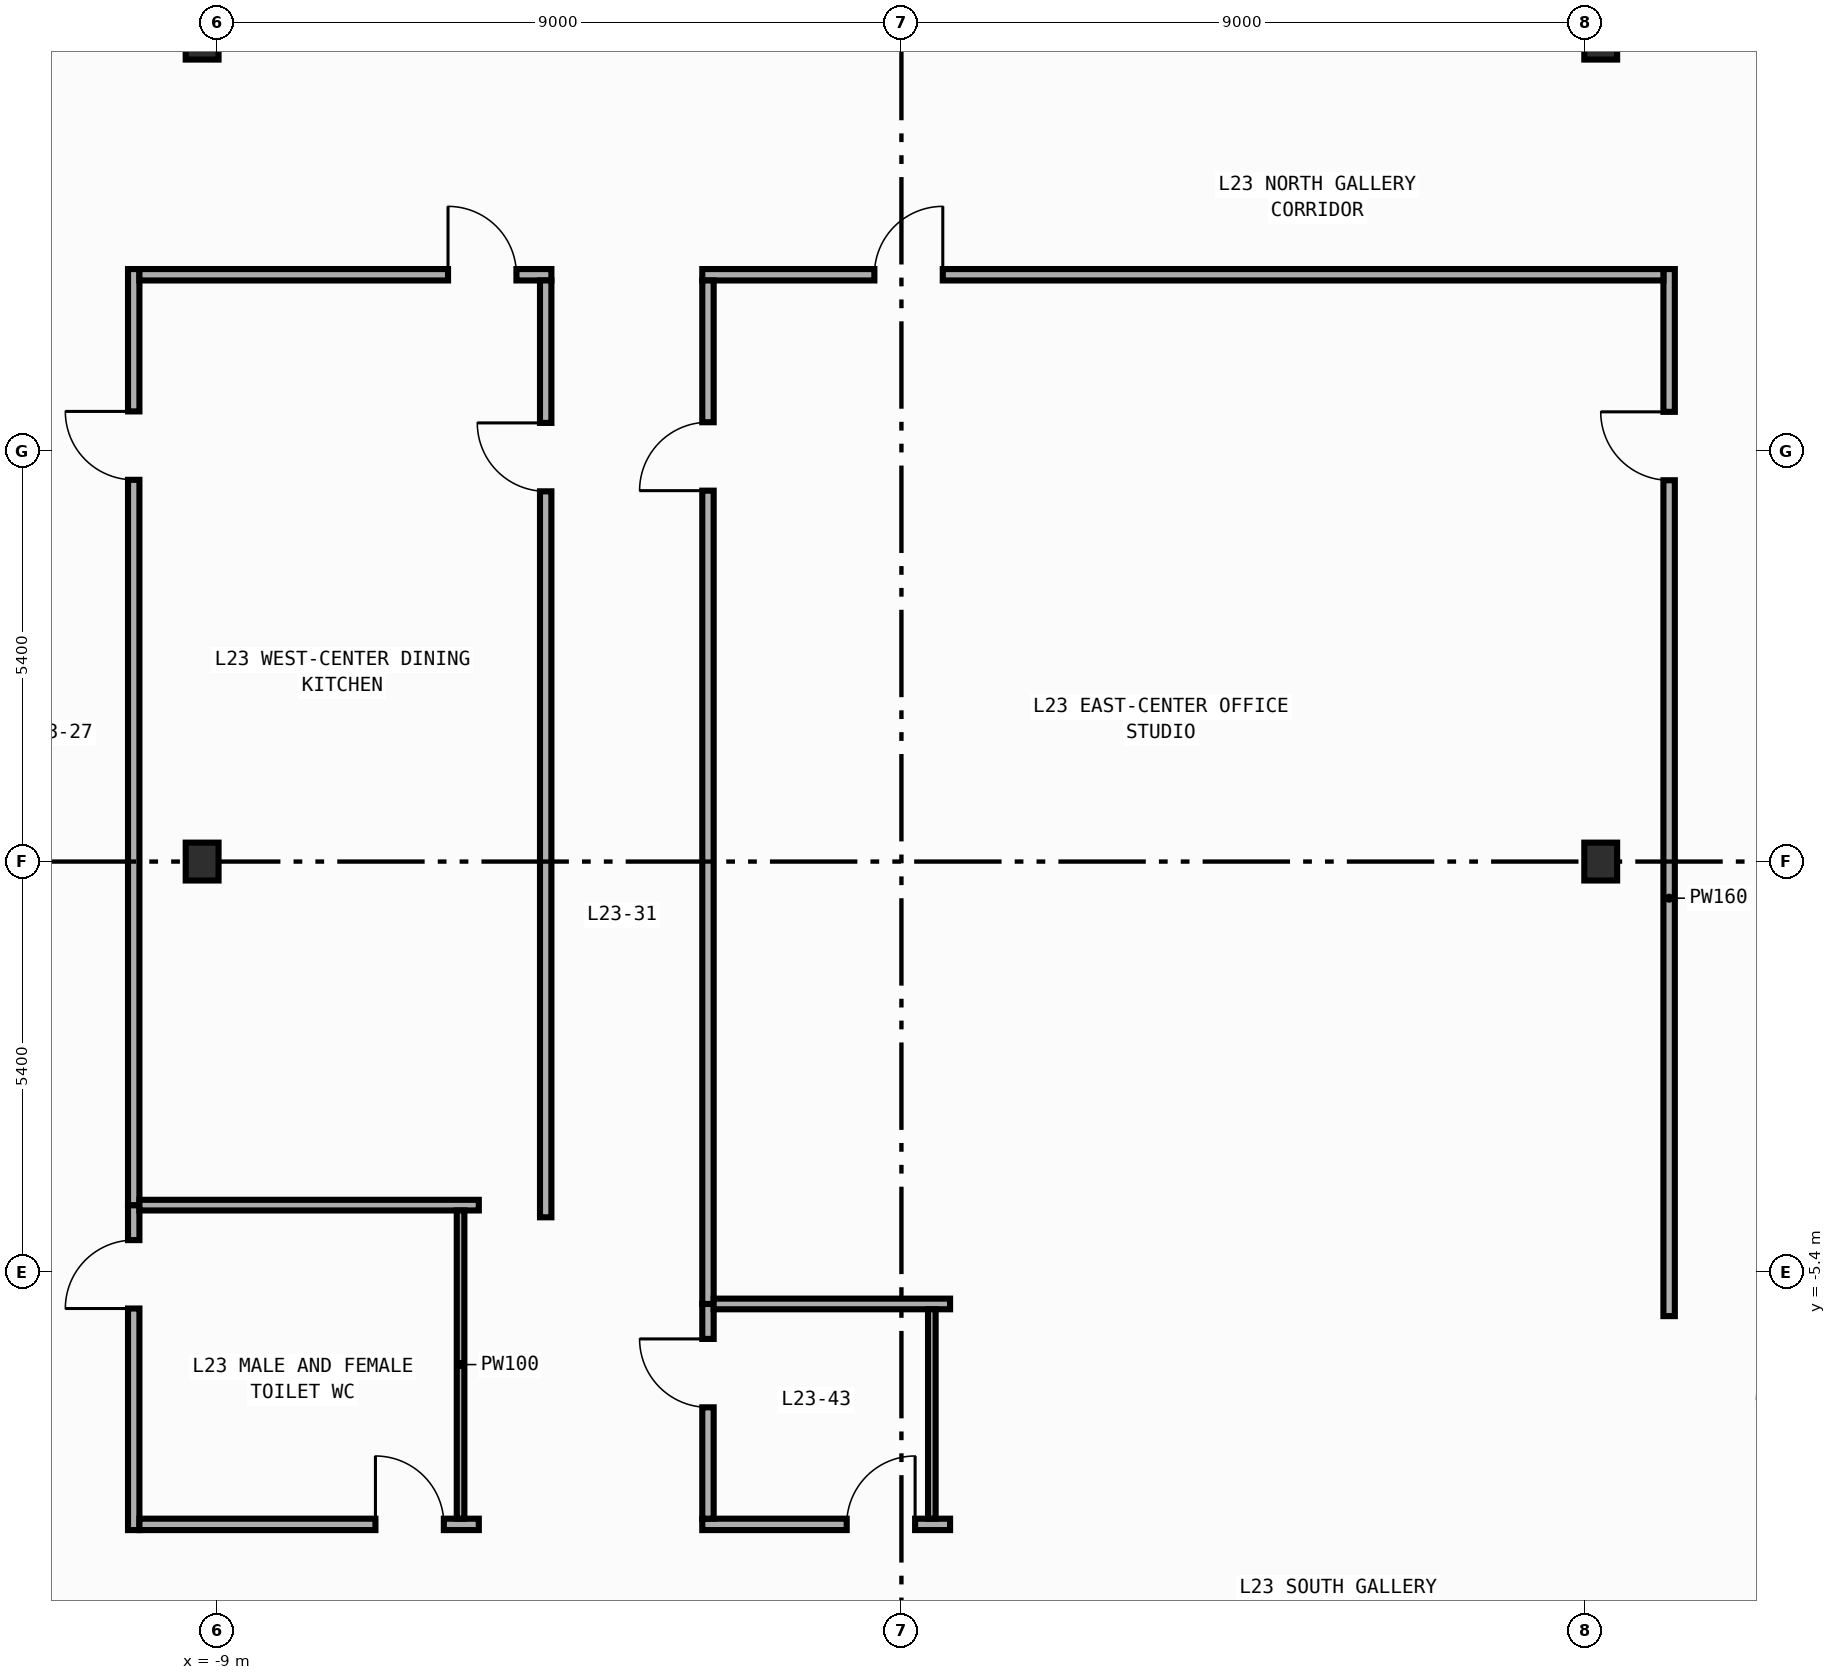
"""IFC4 building model, lengths in metres.
Left out: names, types, materials, properties, quantities, classifications, styles, units other than length and angle.
Written with IfcOpenShell. Run it as: python <this file> out.ifc"""

import sys

from ifc_helpers import new_model, si_unit, direction, frame, frame_2d, origin, origin_2d, place, context, subcontext, project, spatial, rectangle, i_section, extrude, element, fill, save


model = new_model("IFC4")
c1 = context("Model", 3, precision=1e-05, world=origin(), true_north=direction((0.0, 1.0)))
c2 = subcontext(c1, "Body", "Model", "MODEL_VIEW")
j1 = project(units=[si_unit("LENGTHUNIT", "METRE"), si_unit("PLANEANGLEUNIT", "RADIAN")], contexts=[c1])
p1 = place(None, origin())
s1 = spatial("IfcSite", under=j1, at=p1, CompositionType="ELEMENT")
p2 = place(p1, origin())
s2 = spatial("IfcBuilding", under=s1, at=p2, CompositionType="ELEMENT")
p3 = place(p2, frame((0.0, 0.0, 101.6)))
s3 = spatial("IfcBuildingStorey", under=s2, at=p3, CompositionType="ELEMENT", Elevation=101.6)
for number, where, z_axis, x_axis in (
    (1, (-9.2, 0.0, 0.0), (0.0, 0.0, 1.0), (1.0, 0.0, 0.0)),
    (2, (-9.2, 10.8, 0.0), (0.0, 0.0, 1.0), (1.0, 0.0, 0.0)),
    (3, (9.2, 0.0, 0.0), (0.0, 0.0, 1.0), (1.0, 0.0, 0.0)),
    (4, (9.2, 10.8, 0.0), (0.0, 0.0, 1.0), (1.0, 0.0, 0.0)),
):
    element("IfcColumn", number, at=place(p3, frame(where, z_axis=z_axis, x_axis=x_axis)), inside=s3, PredefinedType="COLUMN", context=c2, shape_type="SweptSolid", body=[
        extrude(i_section(OverallWidth=0.432, OverallDepth=0.498, WebThickness=0.045, FlangeThickness=0.07, FilletRadius=0.022, at=origin_2d()), origin(), (0.0, 0.0, 1.0), 4.2),
    ])
p4 = place(p3, frame((-10.1, -8.795, 0.0), z_axis=(0.0, 0.0, 1.0), x_axis=(0.0, 1.0, 0.0)))
e5 = element("IfcWall", 5, at=p4, inside=s3, PredefinedType="PARTITIONING", context=c2, shape_type="SweptSolid", body=[
    extrude(rectangle(XDim=4.275, YDim=0.15, at=frame_2d((2.137, 0.0))), origin(), (0.0, 0.0, 1.0), 3.94),
])
p5 = place(p4, frame((2.915, 0.0, 0.0)))
e6 = element("IfcOpeningElement", 6, at=p5, cuts=e5, PredefinedType="OPENING", context=c2, shape_type="SweptSolid", body=[
    extrude(rectangle(XDim=0.9, YDim=2.15, at=frame_2d((0.45, 1.075))), frame((0.0, 0.085, 0.0), z_axis=(0.0, -1.0, 0.0), x_axis=(1.0, 0.0, 0.0)), (0.0, 0.0, 1.0), 0.17),
])
p6 = place(p3, frame((-10.1, -4.52, 0.0), z_axis=(0.0, 0.0, 1.0), x_axis=(0.0, 1.0, 0.0)))
e7 = element("IfcWall", 7, at=p6, inside=s3, PredefinedType="PARTITIONING", context=c2, shape_type="SweptSolid", body=[
    extrude(rectangle(XDim=12.315, YDim=0.15, at=frame_2d((6.157, 0.0))), origin(), (0.0, 0.0, 1.0), 3.94),
])
p7 = place(p6, frame((9.542, 0.0, 0.0)))
e8 = element("IfcOpeningElement", 8, at=p7, cuts=e7, PredefinedType="OPENING", context=c2, shape_type="SweptSolid", body=[
    extrude(rectangle(XDim=0.9, YDim=2.15, at=frame_2d((0.45, 1.075))), frame((0.0, 0.085, 0.0), z_axis=(0.0, -1.0, 0.0), x_axis=(1.0, 0.0, 0.0)), (0.0, 0.0, 1.0), 0.17),
])
p8 = place(p3, frame((10.1, -5.98, 0.0), z_axis=(0.0, 0.0, 1.0), x_axis=(0.0, 1.0, 0.0)))
e9 = element("IfcWall", 9, at=p8, inside=s3, PredefinedType="PARTITIONING", context=c2, shape_type="SweptSolid", body=[
    extrude(rectangle(XDim=13.775, YDim=0.15, at=frame_2d((6.887, 0.0))), origin(), (0.0, 0.0, 1.0), 3.94),
])
p9 = place(p8, frame((10.997, 0.0, 0.0)))
e10 = element("IfcOpeningElement", 10, at=p9, cuts=e9, PredefinedType="OPENING", context=c2, shape_type="SweptSolid", body=[
    extrude(rectangle(XDim=0.9, YDim=2.15, at=frame_2d((0.45, 1.075))), frame((0.0, 0.085, 0.0), z_axis=(0.0, -1.0, 0.0), x_axis=(1.0, 0.0, 0.0)), (0.0, 0.0, 1.0), 0.17),
])
p10 = place(p3, frame((-2.62, 7.72, 0.0), z_axis=(0.0, 0.0, 1.0), x_axis=(1.0, 0.0, 0.0)))
e11 = element("IfcWall", 11, at=p10, inside=s3, PredefinedType="PARTITIONING", context=c2, shape_type="SweptSolid", body=[
    extrude(rectangle(XDim=12.645, YDim=0.15, at=frame_2d((6.323, 0.0))), origin(), (0.0, 0.0, 1.0), 3.94),
])
p11 = place(p10, frame((2.264, 0.0, 0.0)))
e12 = element("IfcOpeningElement", 12, at=p11, cuts=e11, PredefinedType="OPENING", context=c2, shape_type="SweptSolid", body=[
    extrude(rectangle(XDim=0.9, YDim=2.15, at=frame_2d((0.45, 1.075))), frame((0.0, 0.085, 0.0), z_axis=(0.0, -1.0, 0.0), x_axis=(1.0, 0.0, 0.0)), (0.0, 0.0, 1.0), 0.17),
])
p12 = place(p3, frame((-10.025, 7.72, 0.0), z_axis=(0.0, 0.0, 1.0), x_axis=(1.0, 0.0, 0.0)))
e13 = element("IfcWall", 13, at=p12, inside=s3, PredefinedType="PARTITIONING", context=c2, shape_type="SweptSolid", body=[
    extrude(rectangle(XDim=5.42, YDim=0.15, at=frame_2d((2.71, 0.0))), origin(), (0.0, 0.0, 1.0), 3.94),
])
p13 = place(p12, frame((4.06, 0.0, 0.0)))
e14 = element("IfcOpeningElement", 14, at=p13, cuts=e13, PredefinedType="OPENING", context=c2, shape_type="SweptSolid", body=[
    extrude(rectangle(XDim=0.9, YDim=2.15, at=frame_2d((0.45, 1.075))), frame((0.0, 0.085, 0.0), z_axis=(0.0, -1.0, 0.0), x_axis=(1.0, 0.0, 0.0)), (0.0, 0.0, 1.0), 0.17),
])
p14 = place(p3, frame((-2.62, -8.72, 0.0), z_axis=(0.0, 0.0, 1.0), x_axis=(1.0, 0.0, 0.0)))
e15 = element("IfcWall", 15, at=p14, inside=s3, PredefinedType="PARTITIONING", context=c2, shape_type="SweptSolid", body=[
    extrude(rectangle(XDim=3.26, YDim=0.15, at=frame_2d((1.63, 0.0))), origin(), (0.0, 0.0, 1.0), 3.94),
])
p15 = place(p14, frame((1.9, 0.0, 0.0)))
e16 = element("IfcOpeningElement", 16, at=p15, cuts=e15, PredefinedType="OPENING", context=c2, shape_type="SweptSolid", body=[
    extrude(rectangle(XDim=0.9, YDim=2.15, at=frame_2d((0.45, 1.075))), frame((0.0, 0.085, 0.0), z_axis=(0.0, -1.0, 0.0), x_axis=(1.0, 0.0, 0.0)), (0.0, 0.0, 1.0), 0.17),
])
p16 = place(p3, frame((-10.025, -8.72, 0.0), z_axis=(0.0, 0.0, 1.0), x_axis=(1.0, 0.0, 0.0)))
e17 = element("IfcWall", 17, at=p16, inside=s3, PredefinedType="PARTITIONING", context=c2, shape_type="SweptSolid", body=[
    extrude(rectangle(XDim=4.465, YDim=0.15, at=frame_2d((2.232, 0.0))), origin(), (0.0, 0.0, 1.0), 3.94),
])
p17 = place(p16, frame((3.105, 0.0, 0.0)))
e18 = element("IfcOpeningElement", 18, at=p17, cuts=e17, PredefinedType="OPENING", context=c2, shape_type="SweptSolid", body=[
    extrude(rectangle(XDim=0.9, YDim=2.15, at=frame_2d((0.45, 1.075))), frame((0.0, 0.085, 0.0), z_axis=(0.0, -1.0, 0.0), x_axis=(1.0, 0.0, 0.0)), (0.0, 0.0, 1.0), 0.17),
])
p18 = place(p3, frame((-2.545, -8.645, 0.0), z_axis=(0.0, 0.0, 1.0), x_axis=(0.0, 1.0, 0.0)))
e19 = element("IfcWall", 19, at=p18, inside=s3, PredefinedType="PARTITIONING", context=c2, shape_type="SweptSolid", body=[
    extrude(rectangle(XDim=2.825, YDim=0.15, at=frame_2d((1.413, 0.0))), origin(), (0.0, 0.0, 1.0), 3.94),
])
p19 = place(p18, frame((1.465, 0.0, 0.0)))
e20 = element("IfcOpeningElement", 20, at=p19, cuts=e19, PredefinedType="OPENING", context=c2, shape_type="SweptSolid", body=[
    extrude(rectangle(XDim=0.9, YDim=2.15, at=frame_2d((0.45, 1.075))), frame((0.0, 0.085, 0.0), z_axis=(0.0, -1.0, 0.0), x_axis=(1.0, 0.0, 0.0)), (0.0, 0.0, 1.0), 0.17),
])
p20 = place(p3, frame((-2.545, -5.82, 0.0), z_axis=(0.0, 0.0, 1.0), x_axis=(0.0, 1.0, 0.0)))
e21 = element("IfcWall", 21, at=p20, inside=s3, PredefinedType="PARTITIONING", context=c2, shape_type="SweptSolid", body=[
    extrude(rectangle(XDim=13.465, YDim=0.15, at=frame_2d((6.732, 0.0))), origin(), (0.0, 0.0, 1.0), 3.94),
])
p21 = place(p20, frame((10.7, 0.0, 0.0)))
e22 = element("IfcOpeningElement", 22, at=p21, cuts=e21, PredefinedType="OPENING", context=c2, shape_type="SweptSolid", body=[
    extrude(rectangle(XDim=0.9, YDim=2.15, at=frame_2d((0.45, 1.075))), frame((0.0, 0.085, 0.0), z_axis=(0.0, -1.0, 0.0), x_axis=(1.0, 0.0, 0.0)), (0.0, 0.0, 1.0), 0.17),
])
p22 = place(p3, frame((-4.68, -4.68, 0.0), z_axis=(0.0, 0.0, 1.0), x_axis=(0.0, 1.0, 0.0)))
e23 = element("IfcWall", 23, at=p22, inside=s3, PredefinedType="PARTITIONING", context=c2, shape_type="SweptSolid", body=[
    extrude(rectangle(XDim=12.325, YDim=0.15, at=frame_2d((6.163, 0.0))), origin(), (0.0, 0.0, 1.0), 3.49),
])
p23 = place(p22, frame((9.551, 0.0, 0.0)))
e24 = element("IfcOpeningElement", 24, at=p23, cuts=e23, PredefinedType="OPENING", context=c2, shape_type="SweptSolid", body=[
    extrude(rectangle(XDim=0.9, YDim=2.15, at=frame_2d((0.45, 1.075))), frame((0.0, 0.085, 0.0), z_axis=(0.0, -1.0, 0.0), x_axis=(1.0, 0.0, 0.0)), (0.0, 0.0, 1.0), 0.17),
])
p24 = place(p3, frame((-2.47, -5.82, 0.0), z_axis=(0.0, 0.0, 1.0), x_axis=(1.0, 0.0, 0.0)))
e25 = element("IfcWall", 25, at=p24, inside=s3, PredefinedType="PARTITIONING", context=c2, shape_type="SweptSolid", body=[
    extrude(rectangle(XDim=3.11, YDim=0.14, at=frame_2d((1.555, 0.0))), origin(), (0.0, 0.0, 1.0), 3.94),
])
p25 = place(p3, frame((-10.025, -4.52, 0.0), z_axis=(0.0, 0.0, 1.0), x_axis=(1.0, 0.0, 0.0)))
e26 = element("IfcWall", 26, at=p25, inside=s3, PredefinedType="PARTITIONING", context=c2, shape_type="SweptSolid", body=[
    extrude(rectangle(XDim=4.465, YDim=0.14, at=frame_2d((2.232, 0.0))), origin(), (0.0, 0.0, 1.0), 3.94),
])
p26 = place(p3, frame((0.4, -5.89, 0.0), z_axis=(0.0, 0.0, 1.0), x_axis=(0.0, -1.0, 0.0)))
e27 = element("IfcWall", 27, at=p26, inside=s3, PredefinedType="PARTITIONING", context=c2, shape_type="SweptSolid", body=[
    extrude(rectangle(XDim=2.755, YDim=0.1, at=frame_2d((1.377, 0.0))), origin(), (0.0, 0.0, 1.0), 3.94),
])
p27 = place(p3, frame((-5.8, -4.59, 0.0), z_axis=(0.0, 0.0, 1.0), x_axis=(0.0, -1.0, 0.0)))
e28 = element("IfcWall", 28, at=p27, inside=s3, PredefinedType="PARTITIONING", context=c2, shape_type="SweptSolid", body=[
    extrude(rectangle(XDim=4.055, YDim=0.1, at=frame_2d((2.027, 0.0))), origin(), (0.0, 0.0, 1.0), 3.94),
])
p28 = place(p5, origin())
e29 = element("IfcDoor", 29, at=p28, inside=s3, OperationType="SINGLE_SWING_LEFT", PredefinedType="DOOR", context=c2, shape_type="SweptSolid", body=[
    extrude(rectangle(XDim=0.9, YDim=2.15, at=frame_2d((0.45, 1.075))), frame((0.0, 0.025, 0.0), z_axis=(0.0, -1.0, 0.0), x_axis=(1.0, 0.0, 0.0)), (0.0, 0.0, 1.0), 0.05),
])
fill(e6, e29)
p29 = place(p7, origin())
e30 = element("IfcDoor", 30, at=p29, inside=s3, OperationType="SINGLE_SWING_RIGHT", PredefinedType="DOOR", context=c2, shape_type="SweptSolid", body=[
    extrude(rectangle(XDim=0.9, YDim=2.15, at=frame_2d((0.45, 1.075))), frame((0.0, 0.025, 0.0), z_axis=(0.0, -1.0, 0.0), x_axis=(1.0, 0.0, 0.0)), (0.0, 0.0, 1.0), 0.05),
])
fill(e8, e30)
p30 = place(p9, origin())
e31 = element("IfcDoor", 31, at=p30, inside=s3, OperationType="SINGLE_SWING_RIGHT", PredefinedType="DOOR", context=c2, shape_type="SweptSolid", body=[
    extrude(rectangle(XDim=0.9, YDim=2.15, at=frame_2d((0.45, 1.075))), frame((0.0, 0.025, 0.0), z_axis=(0.0, -1.0, 0.0), x_axis=(1.0, 0.0, 0.0)), (0.0, 0.0, 1.0), 0.05),
])
fill(e10, e31)
p31 = place(p11, origin())
e32 = element("IfcDoor", 32, at=p31, inside=s3, OperationType="SINGLE_SWING_RIGHT", PredefinedType="DOOR", context=c2, shape_type="SweptSolid", body=[
    extrude(rectangle(XDim=0.9, YDim=2.15, at=frame_2d((0.45, 1.075))), frame((0.0, 0.025, 0.0), z_axis=(0.0, -1.0, 0.0), x_axis=(1.0, 0.0, 0.0)), (0.0, 0.0, 1.0), 0.05),
])
fill(e12, e32)
p32 = place(p13, origin())
e33 = element("IfcDoor", 33, at=p32, inside=s3, OperationType="SINGLE_SWING_LEFT", PredefinedType="DOOR", context=c2, shape_type="SweptSolid", body=[
    extrude(rectangle(XDim=0.9, YDim=2.15, at=frame_2d((0.45, 1.075))), frame((0.0, 0.025, 0.0), z_axis=(0.0, -1.0, 0.0), x_axis=(1.0, 0.0, 0.0)), (0.0, 0.0, 1.0), 0.05),
])
fill(e14, e33)
p33 = place(p15, origin())
e34 = element("IfcDoor", 34, at=p33, inside=s3, OperationType="SINGLE_SWING_RIGHT", PredefinedType="DOOR", context=c2, shape_type="SweptSolid", body=[
    extrude(rectangle(XDim=0.9, YDim=2.15, at=frame_2d((0.45, 1.075))), frame((0.0, 0.025, 0.0), z_axis=(0.0, -1.0, 0.0), x_axis=(1.0, 0.0, 0.0)), (0.0, 0.0, 1.0), 0.05),
])
fill(e16, e34)
p34 = place(p17, origin())
e35 = element("IfcDoor", 35, at=p34, inside=s3, OperationType="SINGLE_SWING_LEFT", PredefinedType="DOOR", context=c2, shape_type="SweptSolid", body=[
    extrude(rectangle(XDim=0.9, YDim=2.15, at=frame_2d((0.45, 1.075))), frame((0.0, 0.025, 0.0), z_axis=(0.0, -1.0, 0.0), x_axis=(1.0, 0.0, 0.0)), (0.0, 0.0, 1.0), 0.05),
])
fill(e18, e35)
p35 = place(p19, origin())
e36 = element("IfcDoor", 36, at=p35, inside=s3, OperationType="SINGLE_SWING_RIGHT", PredefinedType="DOOR", context=c2, shape_type="SweptSolid", body=[
    extrude(rectangle(XDim=0.9, YDim=2.15, at=frame_2d((0.45, 1.075))), frame((0.0, 0.025, 0.0), z_axis=(0.0, -1.0, 0.0), x_axis=(1.0, 0.0, 0.0)), (0.0, 0.0, 1.0), 0.05),
])
fill(e20, e36)
p36 = place(p21, origin())
e37 = element("IfcDoor", 37, at=p36, inside=s3, OperationType="SINGLE_SWING_LEFT", PredefinedType="DOOR", context=c2, shape_type="SweptSolid", body=[
    extrude(rectangle(XDim=0.9, YDim=2.15, at=frame_2d((0.45, 1.075))), frame((0.0, 0.025, 0.0), z_axis=(0.0, -1.0, 0.0), x_axis=(1.0, 0.0, 0.0)), (0.0, 0.0, 1.0), 0.05),
])
fill(e22, e37)
p37 = place(p23, origin())
e38 = element("IfcDoor", 38, at=p37, inside=s3, OperationType="SINGLE_SWING_RIGHT", PredefinedType="DOOR", context=c2, shape_type="SweptSolid", body=[
    extrude(rectangle(XDim=0.9, YDim=2.15, at=frame_2d((0.45, 1.075))), frame((0.0, 0.025, 0.0), z_axis=(0.0, -1.0, 0.0), x_axis=(1.0, 0.0, 0.0)), (0.0, 0.0, 1.0), 0.05),
])
fill(e24, e38)
save(model, sys.argv[1])
